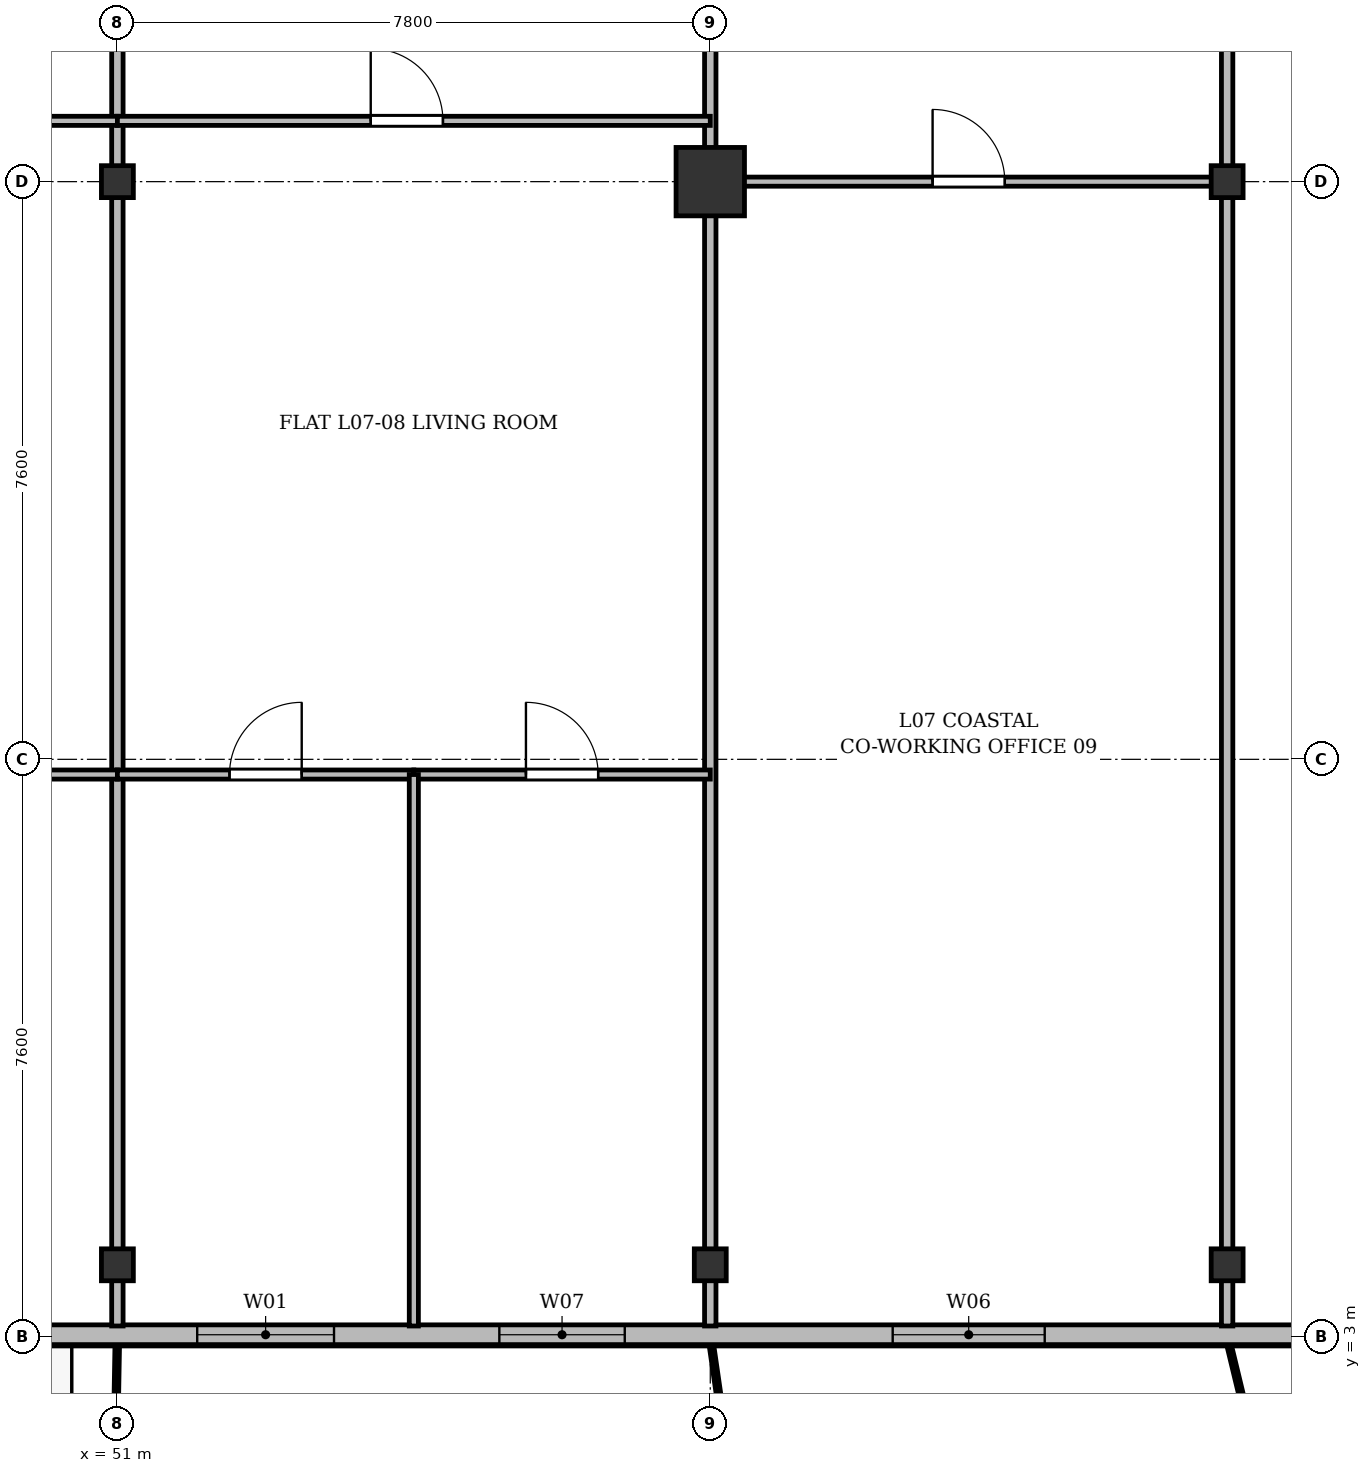
"""IFC4 building model, lengths in metres.
Left out: names, types, materials, properties, quantities, classifications, styles, units other than length and angle.
Written with IfcOpenShell. Run it as: python <this file> out.ifc"""

import sys

from ifc_helpers import new_model, si_unit, direction, frame, frame_2d, origin, origin_2d, place, context, subcontext, project, spatial, rectangle, i_section, extrude, source, transform, mapped, element, fill, save


model = new_model("IFC4")
c1 = context("Model", 3, precision=1e-05, world=origin(), true_north=direction((0.0, 1.0)))
c2 = subcontext(c1, "Body", "Model", "MODEL_VIEW")
j1 = project(units=[si_unit("LENGTHUNIT", "METRE"), si_unit("PLANEANGLEUNIT", "RADIAN")], contexts=[c1])
p1 = place(None, origin())
s1 = spatial("IfcSite", under=j1, at=p1, CompositionType="ELEMENT")
p2 = place(p1, origin())
s2 = spatial("IfcBuilding", under=s1, at=p2, CompositionType="ELEMENT")
p3 = place(p2, frame((0.0, 0.0, 30.7)))
s3 = spatial("IfcBuildingStorey", under=s2, at=p3, CompositionType="ELEMENT", Elevation=30.7)
m1 = source(origin(), c2, "Body", "SweptSolid", [
    extrude(i_section(OverallWidth=0.42, OverallDepth=0.42, WebThickness=0.026, FlangeThickness=0.04, at=origin_2d()), origin(), (0.0, 0.0, 1.0), 3.6),
])
for number, where, z_axis, x_axis in (
    (1, (51.0, 3.95, 0.0), (0.0, 0.0, 1.0), (1.0, 0.0, 0.0)),
    (2, (51.0, 18.2, 0.0), (0.0, 0.0, 1.0), (1.0, 0.0, 0.0)),
    (3, (58.8, 3.95, 0.0), (0.0, 0.0, 1.0), (1.0, 0.0, 0.0)),
):
    element("IfcColumn", number, at=place(p3, frame(where, z_axis=z_axis, x_axis=x_axis)), inside=s3, PredefinedType="COLUMN", context=c2, shape_type="MappedRepresentation", body=[
        mapped(m1, transform((0.0, 0.0, 0.0), x_axis=(1.0, 0.0, 0.0), y_axis=(0.0, 1.0, 0.0), z_axis=(0.0, 0.0, 1.0), scale=1.0)),
    ])
m2 = source(origin(), c2, "Body", "SweptSolid", [
    extrude(rectangle(XDim=0.9, YDim=0.9, at=origin_2d()), origin(), (0.0, 0.0, 1.0), 3.6),
])
p4 = place(p3, frame((58.8, 18.2, 0.0), z_axis=(0.0, 0.0, 1.0), x_axis=(1.0, 0.0, 0.0)))
e4 = element("IfcColumn", 4, at=p4, inside=s3, PredefinedType="COLUMN", context=c2, shape_type="MappedRepresentation", body=[
    mapped(m2, transform((0.0, 0.0, 0.0), x_axis=(1.0, 0.0, 0.0), y_axis=(0.0, 1.0, 0.0), z_axis=(0.0, 0.0, 1.0), scale=1.0)),
])
for number, where, z_axis, x_axis in (
    (5, (65.6, 3.95, 0.0), (0.0, 0.0, 1.0), (1.0, 0.0, 0.0)),
    (6, (65.6, 18.2, 0.0), (0.0, 0.0, 1.0), (1.0, 0.0, 0.0)),
):
    element("IfcColumn", number, at=place(p3, frame(where, z_axis=z_axis, x_axis=x_axis)), inside=s3, PredefinedType="COLUMN", context=c2, shape_type="MappedRepresentation", body=[
        mapped(m1, transform((0.0, 0.0, 0.0), x_axis=(1.0, 0.0, 0.0), y_axis=(0.0, 1.0, 0.0), z_axis=(0.0, 0.0, 1.0), scale=1.0)),
    ])
p5 = place(p3, frame((66.9, 3.03, 0.0), z_axis=(0.0, 0.0, 1.0), x_axis=(-1.0, 0.0, 0.0)))
e7 = element("IfcWall", 7, at=p5, inside=s3, PredefinedType="SOLIDWALL", context=c2, shape_type="SweptSolid", body=[
    extrude(rectangle(XDim=59.4, YDim=0.26, at=frame_2d((29.7, 0.0))), origin(), (0.0, 0.0, 1.0), 3.34),
])
p6 = place(p5, frame((3.7, 0.0, 0.9)))
e8 = element("IfcOpeningElement", 8, at=p6, cuts=e7, PredefinedType="OPENING", context=c2, shape_type="SweptSolid", body=[
    extrude(rectangle(XDim=2.0, YDim=1.95, at=frame_2d((1.0, 0.975))), frame((0.0, 0.14, 0.0), z_axis=(0.0, -1.0, 0.0), x_axis=(1.0, 0.0, 0.0)), (0.0, 0.0, 1.0), 0.28),
])
p7 = place(p5, frame((9.225, 0.0, 0.9)))
e9 = element("IfcOpeningElement", 9, at=p7, cuts=e7, PredefinedType="OPENING", context=c2, shape_type="SweptSolid", body=[
    extrude(rectangle(XDim=1.65, YDim=1.85, at=frame_2d((0.825, 0.925))), frame((0.0, 0.14, 0.0), z_axis=(0.0, -1.0, 0.0), x_axis=(1.0, 0.0, 0.0)), (0.0, 0.0, 1.0), 0.28),
])
p8 = place(p5, frame((13.05, 0.0, 0.9)))
e10 = element("IfcOpeningElement", 10, at=p8, cuts=e7, PredefinedType="OPENING", context=c2, shape_type="SweptSolid", body=[
    extrude(rectangle(XDim=1.8, YDim=1.8, at=frame_2d((0.9, 0.9))), frame((0.0, 0.14, 0.0), z_axis=(0.0, -1.0, 0.0), x_axis=(1.0, 0.0, 0.0)), (0.0, 0.0, 1.0), 0.28),
])
p9 = place(p5, frame((17.007, 0.0, 0.0)))
e11 = element("IfcOpeningElement", 11, at=p9, cuts=e7, PredefinedType="OPENING", context=c2, shape_type="SweptSolid", body=[
    extrude(rectangle(XDim=1.2, YDim=2.2, at=frame_2d((0.6, 1.1))), frame((0.0, 0.14, 0.0), z_axis=(0.0, -1.0, 0.0), x_axis=(1.0, 0.0, 0.0)), (0.0, 0.0, 1.0), 0.28),
])
p10 = place(p5, frame((20.55, 0.0, 0.9)))
e12 = element("IfcOpeningElement", 12, at=p10, cuts=e7, PredefinedType="OPENING", context=c2, shape_type="SweptSolid", body=[
    extrude(rectangle(XDim=1.5, YDim=1.75, at=frame_2d((0.75, 0.875))), frame((0.0, 0.14, 0.0), z_axis=(0.0, -1.0, 0.0), x_axis=(1.0, 0.0, 0.0)), (0.0, 0.0, 1.0), 0.28),
])
p11 = place(p5, frame((23.75, 0.0, 0.9)))
e13 = element("IfcOpeningElement", 13, at=p11, cuts=e7, PredefinedType="OPENING", context=c2, shape_type="SweptSolid", body=[
    extrude(rectangle(XDim=2.0, YDim=1.95, at=frame_2d((1.0, 0.975))), frame((0.0, 0.14, 0.0), z_axis=(0.0, -1.0, 0.0), x_axis=(1.0, 0.0, 0.0)), (0.0, 0.0, 1.0), 0.28),
])
p12 = place(p5, frame((27.225, 0.0, 0.9)))
e14 = element("IfcOpeningElement", 14, at=p12, cuts=e7, PredefinedType="OPENING", context=c2, shape_type="SweptSolid", body=[
    extrude(rectangle(XDim=1.65, YDim=1.85, at=frame_2d((0.825, 0.925))), frame((0.0, 0.14, 0.0), z_axis=(0.0, -1.0, 0.0), x_axis=(1.0, 0.0, 0.0)), (0.0, 0.0, 1.0), 0.28),
])
p13 = place(p5, frame((32.1, 0.0, 0.9)))
e15 = element("IfcOpeningElement", 15, at=p13, cuts=e7, PredefinedType="OPENING", context=c2, shape_type="SweptSolid", body=[
    extrude(rectangle(XDim=1.8, YDim=1.8, at=frame_2d((0.9, 0.9))), frame((0.0, 0.14, 0.0), z_axis=(0.0, -1.0, 0.0), x_axis=(1.0, 0.0, 0.0)), (0.0, 0.0, 1.0), 0.28),
])
p14 = place(p5, frame((36.75, 0.0, 0.9)))
e16 = element("IfcOpeningElement", 16, at=p14, cuts=e7, PredefinedType="OPENING", context=c2, shape_type="SweptSolid", body=[
    extrude(rectangle(XDim=1.5, YDim=1.75, at=frame_2d((0.75, 0.875))), frame((0.0, 0.14, 0.0), z_axis=(0.0, -1.0, 0.0), x_axis=(1.0, 0.0, 0.0)), (0.0, 0.0, 1.0), 0.28),
])
p15 = place(p5, frame((39.15, 0.0, 0.9)))
e17 = element("IfcOpeningElement", 17, at=p15, cuts=e7, PredefinedType="OPENING", context=c2, shape_type="SweptSolid", body=[
    extrude(rectangle(XDim=1.5, YDim=1.75, at=frame_2d((0.75, 0.875))), frame((0.0, 0.14, 0.0), z_axis=(0.0, -1.0, 0.0), x_axis=(1.0, 0.0, 0.0)), (0.0, 0.0, 1.0), 0.28),
])
p16 = place(p5, frame((41.3, 0.0, 0.9)))
e18 = element("IfcOpeningElement", 18, at=p16, cuts=e7, PredefinedType="OPENING", context=c2, shape_type="SweptSolid", body=[
    extrude(rectangle(XDim=2.0, YDim=1.95, at=frame_2d((1.0, 0.975))), frame((0.0, 0.14, 0.0), z_axis=(0.0, -1.0, 0.0), x_axis=(1.0, 0.0, 0.0)), (0.0, 0.0, 1.0), 0.28),
])
p17 = place(p5, frame((45.435, 0.0, 0.0)))
e19 = element("IfcOpeningElement", 19, at=p17, cuts=e7, PredefinedType="OPENING", context=c2, shape_type="SweptSolid", body=[
    extrude(rectangle(XDim=1.2, YDim=2.2, at=frame_2d((0.6, 1.1))), frame((0.0, 0.14, 0.0), z_axis=(0.0, -1.0, 0.0), x_axis=(1.0, 0.0, 0.0)), (0.0, 0.0, 1.0), 0.28),
])
p18 = place(p5, frame((48.45, 0.0, 0.9)))
e20 = element("IfcOpeningElement", 20, at=p18, cuts=e7, PredefinedType="OPENING", context=c2, shape_type="SweptSolid", body=[
    extrude(rectangle(XDim=1.8, YDim=1.8, at=frame_2d((0.9, 0.9))), frame((0.0, 0.14, 0.0), z_axis=(0.0, -1.0, 0.0), x_axis=(1.0, 0.0, 0.0)), (0.0, 0.0, 1.0), 0.28),
])
p19 = place(p5, frame((51.9, 0.0, 0.9)))
e21 = element("IfcOpeningElement", 21, at=p19, cuts=e7, PredefinedType="OPENING", context=c2, shape_type="SweptSolid", body=[
    extrude(rectangle(XDim=2.2, YDim=1.8, at=frame_2d((1.1, 0.9))), frame((0.0, 0.14, 0.0), z_axis=(0.0, -1.0, 0.0), x_axis=(1.0, 0.0, 0.0)), (0.0, 0.0, 1.0), 0.28),
])
p20 = place(p5, frame((55.65, 0.0, 0.9)))
e22 = element("IfcOpeningElement", 22, at=p20, cuts=e7, PredefinedType="OPENING", context=c2, shape_type="SweptSolid", body=[
    extrude(rectangle(XDim=1.5, YDim=1.75, at=frame_2d((0.75, 0.875))), frame((0.0, 0.14, 0.0), z_axis=(0.0, -1.0, 0.0), x_axis=(1.0, 0.0, 0.0)), (0.0, 0.0, 1.0), 0.28),
])
for number, where, z_axis, x_axis in (
    (23, (51.0, 3.145, 0.0), (0.0, 0.0, 1.0), (0.0, 1.0, 0.0)),
    (24, (58.8, 3.145, 0.0), (0.0, 0.0, 1.0), (0.0, 1.0, 0.0)),
    (25, (65.6, 3.145, 0.0), (0.0, 0.0, 1.0), (0.0, 1.0, 0.0)),
):
    element("IfcWall", number, at=place(p3, frame(where, z_axis=z_axis, x_axis=x_axis)), inside=s3, PredefinedType="PARTITIONING", context=c2, shape_type="SweptSolid", body=[
        extrude(rectangle(XDim=24.455, YDim=0.15, at=frame_2d((12.228, 0.0))), origin(), (0.0, 0.0, 1.0), 2.752),
    ])
p21 = place(p3, frame((43.8, 19.0, 0.0), z_axis=(0.0, 0.0, 1.0), x_axis=(1.0, 0.0, 0.0)))
e26 = element("IfcWall", 26, at=p21, inside=s3, PredefinedType="PARTITIONING", context=c2, shape_type="SweptSolid", body=[
    extrude(rectangle(XDim=7.2, YDim=0.12, at=frame_2d((3.6, 0.0))), origin(), (0.0, 0.0, 1.0), 2.752),
])
p22 = place(p21, frame((3.125, 0.0, 0.0)))
e27 = element("IfcOpeningElement", 27, at=p22, cuts=e26, PredefinedType="OPENING", context=c2, shape_type="SweptSolid", body=[
    extrude(rectangle(XDim=0.95, YDim=2.15, at=frame_2d((0.475, 1.075))), frame((0.0, 0.07, 0.0), z_axis=(0.0, -1.0, 0.0), x_axis=(1.0, 0.0, 0.0)), (0.0, 0.0, 1.0), 0.14),
])
p23 = place(p3, frame((47.4, 10.4, 0.0), z_axis=(0.0, 0.0, 1.0), x_axis=(1.0, 0.0, 0.0)))
e28 = element("IfcWall", 28, at=p23, inside=s3, PredefinedType="PARTITIONING", context=c2, shape_type="SweptSolid", body=[
    extrude(rectangle(XDim=3.6, YDim=0.12, at=frame_2d((1.8, 0.0))), origin(), (0.0, 0.0, 1.0), 2.752),
])
p24 = place(p23, frame((1.325, 0.0, 0.0)))
e29 = element("IfcOpeningElement", 29, at=p24, cuts=e28, PredefinedType="OPENING", context=c2, shape_type="SweptSolid", body=[
    extrude(rectangle(XDim=0.95, YDim=2.15, at=frame_2d((0.475, 1.075))), frame((0.0, 0.07, 0.0), z_axis=(0.0, -1.0, 0.0), x_axis=(1.0, 0.0, 0.0)), (0.0, 0.0, 1.0), 0.14),
])
p25 = place(p3, frame((51.0, 19.0, 0.0), z_axis=(0.0, 0.0, 1.0), x_axis=(1.0, 0.0, 0.0)))
e30 = element("IfcWall", 30, at=p25, inside=s3, PredefinedType="PARTITIONING", context=c2, shape_type="SweptSolid", body=[
    extrude(rectangle(XDim=7.8, YDim=0.12, at=frame_2d((3.9, 0.0))), origin(), (0.0, 0.0, 1.0), 2.752),
])
p26 = place(p25, frame((3.333, 0.0, 0.0)))
e31 = element("IfcOpeningElement", 31, at=p26, cuts=e30, PredefinedType="OPENING", context=c2, shape_type="SweptSolid", body=[
    extrude(rectangle(XDim=0.95, YDim=2.15, at=frame_2d((0.475, 1.075))), frame((0.0, 0.07, 0.0), z_axis=(0.0, -1.0, 0.0), x_axis=(1.0, 0.0, 0.0)), (0.0, 0.0, 1.0), 0.14),
])
p27 = place(p3, frame((51.0, 10.4, 0.0), z_axis=(0.0, 0.0, 1.0), x_axis=(1.0, 0.0, 0.0)))
e32 = element("IfcWall", 32, at=p27, inside=s3, PredefinedType="PARTITIONING", context=c2, shape_type="SweptSolid", body=[
    extrude(rectangle(XDim=3.9, YDim=0.12, at=frame_2d((1.95, 0.0))), origin(), (0.0, 0.0, 1.0), 2.752),
])
p28 = place(p27, frame((1.475, 0.0, 0.0)))
e33 = element("IfcOpeningElement", 33, at=p28, cuts=e32, PredefinedType="OPENING", context=c2, shape_type="SweptSolid", body=[
    extrude(rectangle(XDim=0.95, YDim=2.15, at=frame_2d((0.475, 1.075))), frame((0.0, 0.07, 0.0), z_axis=(0.0, -1.0, 0.0), x_axis=(1.0, 0.0, 0.0)), (0.0, 0.0, 1.0), 0.14),
])
p29 = place(p3, frame((54.9, 10.4, 0.0), z_axis=(0.0, 0.0, 1.0), x_axis=(1.0, 0.0, 0.0)))
e34 = element("IfcWall", 34, at=p29, inside=s3, PredefinedType="PARTITIONING", context=c2, shape_type="SweptSolid", body=[
    extrude(rectangle(XDim=3.9, YDim=0.12, at=frame_2d((1.95, 0.0))), origin(), (0.0, 0.0, 1.0), 2.752),
])
p30 = place(p29, frame((1.475, 0.0, 0.0)))
e35 = element("IfcOpeningElement", 35, at=p30, cuts=e34, PredefinedType="OPENING", context=c2, shape_type="SweptSolid", body=[
    extrude(rectangle(XDim=0.95, YDim=2.15, at=frame_2d((0.475, 1.075))), frame((0.0, 0.07, 0.0), z_axis=(0.0, -1.0, 0.0), x_axis=(1.0, 0.0, 0.0)), (0.0, 0.0, 1.0), 0.14),
])
p31 = place(p3, frame((54.9, 3.145, 0.0), z_axis=(0.0, 0.0, 1.0), x_axis=(0.0, 1.0, 0.0)))
e36 = element("IfcWall", 36, at=p31, inside=s3, PredefinedType="PARTITIONING", context=c2, shape_type="SweptSolid", body=[
    extrude(rectangle(XDim=7.255, YDim=0.12, at=frame_2d((3.627, 0.0))), origin(), (0.0, 0.0, 1.0), 2.69),
])
p32 = place(p3, frame((58.8, 18.2, 0.0), z_axis=(0.0, 0.0, 1.0), x_axis=(1.0, 0.0, 0.0)))
e37 = element("IfcWall", 37, at=p32, inside=s3, PredefinedType="PARTITIONING", context=c2, shape_type="SweptSolid", body=[
    extrude(rectangle(XDim=6.8, YDim=0.12, at=frame_2d((3.4, 0.0))), origin(), (0.0, 0.0, 1.0), 2.69),
])
p33 = place(p32, frame((2.925, 0.0, 0.0)))
e38 = element("IfcOpeningElement", 38, at=p33, cuts=e37, PredefinedType="OPENING", context=c2, shape_type="SweptSolid", body=[
    extrude(rectangle(XDim=0.95, YDim=2.15, at=frame_2d((0.475, 1.075))), frame((0.0, 0.07, 0.0), z_axis=(0.0, -1.0, 0.0), x_axis=(1.0, 0.0, 0.0)), (0.0, 0.0, 1.0), 0.14),
])
m3 = source(origin(), c2, "Body", "SweptSolid", [
    extrude(rectangle(XDim=2.0, YDim=1.95, at=frame_2d((1.0, 0.975))), frame((0.0, 0.03, 0.0), z_axis=(0.0, -1.0, 0.0), x_axis=(1.0, 0.0, 0.0)), (0.0, 0.0, 1.0), 0.06),
])
p34 = place(p6, origin())
e39 = element("IfcWindow", 39, at=p34, inside=s3, PartitioningType="SINGLE_PANEL", PredefinedType="WINDOW", context=c2, shape_type="MappedRepresentation", body=[
    mapped(m3, transform((0.0, 0.0, 0.0), x_axis=(1.0, 0.0, 0.0), y_axis=(0.0, 1.0, 0.0), z_axis=(0.0, 0.0, 1.0), scale=1.0)),
])
fill(e8, e39)
m4 = source(origin(), c2, "Body", "SweptSolid", [
    extrude(rectangle(XDim=1.65, YDim=1.85, at=frame_2d((0.825, 0.925))), frame((0.0, 0.03, 0.0), z_axis=(0.0, -1.0, 0.0), x_axis=(1.0, 0.0, 0.0)), (0.0, 0.0, 1.0), 0.06),
])
p35 = place(p7, origin())
e40 = element("IfcWindow", 40, at=p35, inside=s3, PartitioningType="SINGLE_PANEL", PredefinedType="WINDOW", context=c2, shape_type="MappedRepresentation", body=[
    mapped(m4, transform((0.0, 0.0, 0.0), x_axis=(1.0, 0.0, 0.0), y_axis=(0.0, 1.0, 0.0), z_axis=(0.0, 0.0, 1.0), scale=1.0)),
])
fill(e9, e40)
m5 = source(origin(), c2, "Body", "SweptSolid", [
    extrude(rectangle(XDim=1.8, YDim=1.8, at=frame_2d((0.9, 0.9))), frame((0.0, 0.03, 0.0), z_axis=(0.0, -1.0, 0.0), x_axis=(1.0, 0.0, 0.0)), (0.0, 0.0, 1.0), 0.06),
])
p36 = place(p8, origin())
e41 = element("IfcWindow", 41, at=p36, inside=s3, PartitioningType="SINGLE_PANEL", PredefinedType="WINDOW", context=c2, shape_type="MappedRepresentation", body=[
    mapped(m5, transform((0.0, 0.0, 0.0), x_axis=(1.0, 0.0, 0.0), y_axis=(0.0, 1.0, 0.0), z_axis=(0.0, 0.0, 1.0), scale=1.0)),
])
fill(e10, e41)
m6 = source(origin(), c2, "Body", "SweptSolid", [
    extrude(rectangle(XDim=0.95, YDim=2.15, at=frame_2d((0.475, 1.075))), frame((0.0, 0.025, 0.0), z_axis=(0.0, -1.0, 0.0), x_axis=(1.0, 0.0, 0.0)), (0.0, 0.0, 1.0), 0.05),
])
p37 = place(p26, origin())
e42 = element("IfcDoor", 42, at=p37, inside=s3, OperationType="SINGLE_SWING_LEFT", PredefinedType="DOOR", context=c2, shape_type="MappedRepresentation", body=[
    mapped(m6, transform((0.0, 0.0, 0.0), x_axis=(1.0, 0.0, 0.0), y_axis=(0.0, 1.0, 0.0), z_axis=(0.0, 0.0, 1.0), scale=1.0)),
])
fill(e31, e42)
p38 = place(p28, origin())
e43 = element("IfcDoor", 43, at=p38, inside=s3, OperationType="SINGLE_SWING_RIGHT", PredefinedType="DOOR", context=c2, shape_type="MappedRepresentation", body=[
    mapped(m6, transform((0.0, 0.0, 0.0), x_axis=(1.0, 0.0, 0.0), y_axis=(0.0, 1.0, 0.0), z_axis=(0.0, 0.0, 1.0), scale=1.0)),
])
fill(e33, e43)
p39 = place(p30, origin())
e44 = element("IfcDoor", 44, at=p39, inside=s3, OperationType="SINGLE_SWING_LEFT", PredefinedType="DOOR", context=c2, shape_type="MappedRepresentation", body=[
    mapped(m6, transform((0.0, 0.0, 0.0), x_axis=(1.0, 0.0, 0.0), y_axis=(0.0, 1.0, 0.0), z_axis=(0.0, 0.0, 1.0), scale=1.0)),
])
fill(e35, e44)
p40 = place(p33, origin())
e45 = element("IfcDoor", 45, at=p40, inside=s3, OperationType="SINGLE_SWING_LEFT", PredefinedType="DOOR", context=c2, shape_type="MappedRepresentation", body=[
    mapped(m6, transform((0.0, 0.0, 0.0), x_axis=(1.0, 0.0, 0.0), y_axis=(0.0, 1.0, 0.0), z_axis=(0.0, 0.0, 1.0), scale=1.0)),
])
fill(e38, e45)
save(model, sys.argv[1])
